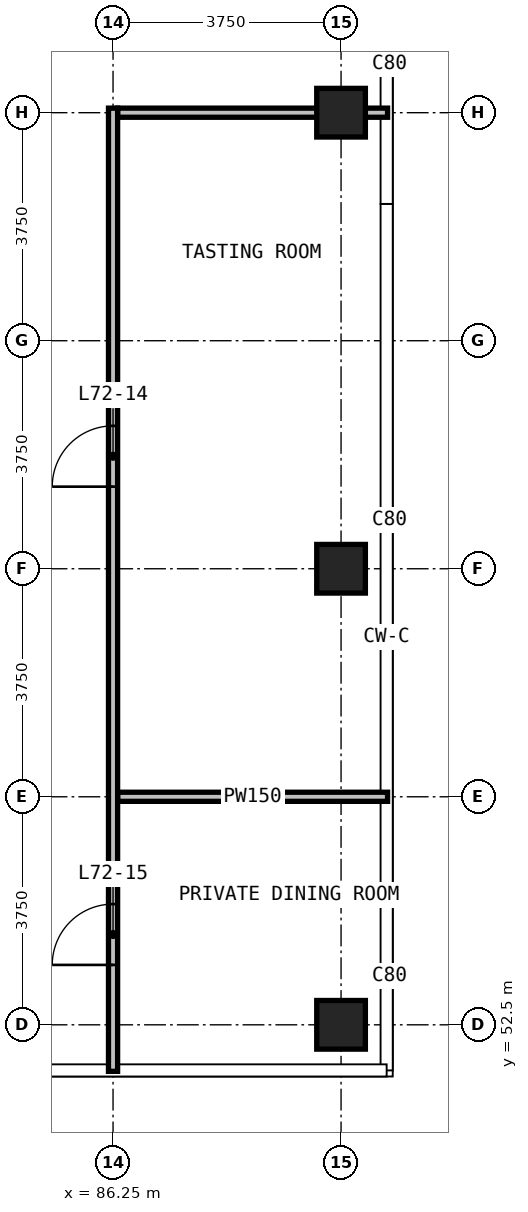
"""IFC4 building model, lengths in metres.
Left out: names, types, materials, properties, quantities, classifications, styles, units other than length and angle.
Written with IfcOpenShell. Run it as: python <this file> out.ifc"""

import sys

from ifc_helpers import new_model, si_unit, direction, frame, frame_2d, origin, origin_2d, place, context, subcontext, project, spatial, rectangle, extrude, element, fill, save


model = new_model("IFC4")
c1 = context("Model", 3, precision=1e-05, world=origin(), true_north=direction((0.0, 1.0)))
c2 = subcontext(c1, "Body", "Model", "MODEL_VIEW")
j1 = project(units=[si_unit("LENGTHUNIT", "METRE"), si_unit("PLANEANGLEUNIT", "RADIAN")], contexts=[c1])
p1 = place(None, origin())
s1 = spatial("IfcSite", under=j1, at=p1, CompositionType="ELEMENT")
p2 = place(p1, origin())
s2 = spatial("IfcBuilding", under=s1, at=p2, CompositionType="ELEMENT")
p3 = place(p2, frame((0.0, 0.0, 276.5)))
s3 = spatial("IfcBuildingStorey", under=s2, at=p3, CompositionType="ELEMENT", Elevation=276.5)
for number, where, z_axis, x_axis in (
    (1, (90.0, 52.5, 0.0), (0.0, 0.0, 1.0), (1.0, 0.0, 0.0)),
    (2, (90.0, 60.0, 0.0), (0.0, 0.0, 1.0), (1.0, 0.0, 0.0)),
    (3, (90.0, 67.5, 0.0), (0.0, 0.0, 1.0), (1.0, 0.0, 0.0)),
):
    element("IfcColumn", number, at=place(p3, frame(where, z_axis=z_axis, x_axis=x_axis)), inside=s3, PredefinedType="COLUMN", context=c2, shape_type="SweptSolid", body=[
        extrude(rectangle(XDim=0.8, YDim=0.8, at=origin_2d()), origin(), (0.0, 0.0, 1.0), 3.6),
    ])
for number, where, z_axis, x_axis in (
    (4, (86.325, 56.25, 0.0), (0.0, 0.0, 1.0), (1.0, 0.0, 0.0)),
    (5, (86.325, 67.5, 0.0), (0.0, 0.0, 1.0), (1.0, 0.0, 0.0)),
):
    element("IfcWall", number, at=place(p3, frame(where, z_axis=z_axis, x_axis=x_axis)), inside=s3, PredefinedType="PARTITIONING", context=c2, shape_type="SweptSolid", body=[
        extrude(rectangle(XDim=4.44, YDim=0.15, at=frame_2d((2.22, 0.0))), origin(), (0.0, 0.0, 1.0), 3.3),
    ])
p4 = place(p3, frame((86.25, 51.735, 0.0), z_axis=(0.0, 0.0, 1.0), x_axis=(0.0, 1.0, 0.0)))
e6 = element("IfcWall", 6, at=p4, inside=s3, PredefinedType="PARTITIONING", context=c2, shape_type="SweptSolid", body=[
    extrude(rectangle(XDim=15.84, YDim=0.15, at=frame_2d((7.92, 0.0))), origin(), (0.0, 0.0, 1.0), 3.3),
])
p5 = place(p4, frame((9.615, 0.0, 0.0)))
e7 = element("IfcOpeningElement", 7, at=p5, cuts=e6, PredefinedType="OPENING", context=c2, shape_type="SweptSolid", body=[
    extrude(rectangle(XDim=1.0, YDim=2.2, at=frame_2d((0.5, 1.1))), frame((0.0, 0.085, 0.0), z_axis=(0.0, -1.0, 0.0), x_axis=(1.0, 0.0, 0.0)), (0.0, 0.0, 1.0), 0.17),
])
p6 = place(p4, frame((1.75, 0.0, 0.0)))
e8 = element("IfcOpeningElement", 8, at=p6, cuts=e6, PredefinedType="OPENING", context=c2, shape_type="SweptSolid", body=[
    extrude(rectangle(XDim=1.0, YDim=2.2, at=frame_2d((0.5, 1.1))), frame((0.0, 0.085, 0.0), z_axis=(0.0, -1.0, 0.0), x_axis=(1.0, 0.0, 0.0)), (0.0, 0.0, 1.0), 0.17),
])
p7 = place(p5, origin())
e9 = element("IfcDoor", 9, at=p7, inside=s3, OperationType="SINGLE_SWING_RIGHT", PredefinedType="DOOR", context=c2, shape_type="SweptSolid", body=[
    extrude(rectangle(XDim=1.0, YDim=2.2, at=frame_2d((0.5, 1.1))), frame((0.0, 0.025, 0.0), z_axis=(0.0, -1.0, 0.0), x_axis=(1.0, 0.0, 0.0)), (0.0, 0.0, 1.0), 0.05),
])
fill(e7, e9)
p8 = place(p6, origin())
e10 = element("IfcDoor", 10, at=p8, inside=s3, OperationType="SINGLE_SWING_RIGHT", PredefinedType="DOOR", context=c2, shape_type="SweptSolid", body=[
    extrude(rectangle(XDim=1.0, YDim=2.2, at=frame_2d((0.5, 1.1))), frame((0.0, 0.025, 0.0), z_axis=(0.0, -1.0, 0.0), x_axis=(1.0, 0.0, 0.0)), (0.0, 0.0, 1.0), 0.05),
])
fill(e8, e10)
save(model, sys.argv[1])
